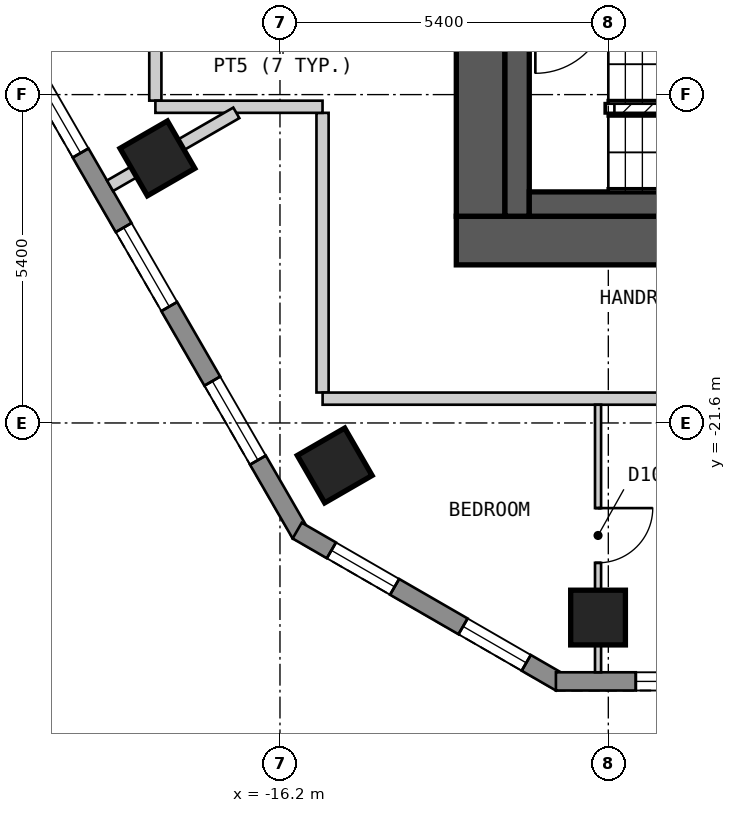
"""IFC4 building model, lengths in metres.
Left out: names, types, materials, properties, quantities, classifications, styles, units other than length and angle.
Written with IfcOpenShell. Run it as: python <this file> out.ifc"""

import sys

from ifc_helpers import new_model, si_unit, direction, frame, frame_2d, origin, origin_2d, place, context, subcontext, project, spatial, polyline, rectangle, outline, extrude, element, fill, save


model = new_model("IFC4")
c1 = context("Model", 3, precision=1e-05, world=origin(), true_north=direction((0.0, 1.0)))
c2 = subcontext(c1, "Body", "Model", "MODEL_VIEW")
j1 = project(units=[si_unit("LENGTHUNIT", "METRE"), si_unit("PLANEANGLEUNIT", "RADIAN")], contexts=[c1])
p1 = place(None, origin())
s1 = spatial("IfcSite", under=j1, at=p1, CompositionType="ELEMENT")
p2 = place(p1, origin())
s2 = spatial("IfcBuilding", under=s1, at=p2, CompositionType="ELEMENT")
p3 = place(p2, frame((0.0, 0.0, 126.6)))
s3 = spatial("IfcBuildingStorey", under=s2, at=p3, CompositionType="ELEMENT", Elevation=126.6)
for number, where, z_axis, x_axis in (
    (1, (-18.216, -17.249, 0.0), (0.0, 0.0, 1.0), (0.5, -0.866, 0.0)),
    (2, (-15.3, -22.299, 0.0), (0.0, 0.0, 1.0), (0.5, -0.866, 0.0)),
    (3, (-10.969, -24.8, 0.0), (0.0, 0.0, 1.0), (1.0, 0.0, 0.0)),
):
    element("IfcColumn", number, at=place(p3, frame(where, z_axis=z_axis, x_axis=x_axis)), inside=s3, PredefinedType="COLUMN", context=c2, shape_type="SweptSolid", body=[
        extrude(rectangle(XDim=0.9, YDim=0.9, at=origin_2d()), origin(), (0.0, 0.0, 1.0), 3.0),
    ])
p4 = place(p3, frame((-13.3, -18.6, 0.0), z_axis=(0.0, 0.0, 1.0), x_axis=(1.0, 0.0, 0.0)))
e4 = element("IfcWall", 4, at=p4, inside=s3, PredefinedType="SHEAR", context=c2, shape_type="SweptSolid", body=[
    extrude(rectangle(XDim=26.6, YDim=0.8, at=frame_2d((13.3, 0.0))), origin(), (0.0, 0.0, 1.0), 2.7),
])
p5 = place(p3, frame((-12.9, -18.2, 0.0), z_axis=(0.0, 0.0, 1.0), x_axis=(0.0, 1.0, 0.0)))
e5 = element("IfcWall", 5, at=p5, inside=s3, PredefinedType="SHEAR", context=c2, shape_type="SweptSolid", body=[
    extrude(rectangle(XDim=12.4, YDim=0.8, at=frame_2d((6.2, 0.0))), origin(), (0.0, 0.0, 1.0), 2.7),
])
p6 = place(p5, frame((4.0, 0.0, 0.0)))
e6 = element("IfcOpeningElement", 6, at=p6, cuts=e5, PredefinedType="OPENING", context=c2, shape_type="SweptSolid", body=[
    extrude(rectangle(XDim=1.2, YDim=2.1, at=frame_2d((0.6, 1.05))), frame((0.0, 0.41, 0.0), z_axis=(0.0, -1.0, 0.0), x_axis=(1.0, 0.0, 0.0)), (0.0, 0.0, 1.0), 0.82),
])
p7 = place(p3, frame((-28.218, -2.025, 0.0), z_axis=(0.0, 0.0, 1.0), x_axis=(0.500017503135, -0.866015298109, 0.0)))
e7 = element("IfcWall", 7, at=p7, inside=s3, PredefinedType="SOLIDWALL", context=c2, shape_type="SweptSolid", body=[
    extrude(outline(polyline([(0.0, -0.15), (24.711, -0.15), (24.631, 0.15), (0.08, 0.15), (0.0, -0.15)])), origin(), (0.0, 0.0, 1.0), 2.7),
])
p8 = place(p7, frame((1.4, 0.0, 0.15)))
e8 = element("IfcOpeningElement", 8, at=p8, cuts=e7, PredefinedType="OPENING", context=c2, shape_type="SweptSolid", body=[
    extrude(rectangle(XDim=1.5, YDim=2.1, at=frame_2d((0.75, 1.05))), frame((0.0, 0.16, 0.0), z_axis=(0.0, -1.0, 0.0), x_axis=(1.0, 0.0, 0.0)), (0.0, 0.0, 1.0), 0.32),
])
p9 = place(p7, frame((4.316, 0.0, 0.15)))
e9 = element("IfcOpeningElement", 9, at=p9, cuts=e7, PredefinedType="OPENING", context=c2, shape_type="SweptSolid", body=[
    extrude(rectangle(XDim=1.5, YDim=2.1, at=frame_2d((0.75, 1.05))), frame((0.0, 0.16, 0.0), z_axis=(0.0, -1.0, 0.0), x_axis=(1.0, 0.0, 0.0)), (0.0, 0.0, 1.0), 0.32),
])
p10 = place(p7, frame((7.231, 0.0, 0.15)))
e10 = element("IfcOpeningElement", 10, at=p10, cuts=e7, PredefinedType="OPENING", context=c2, shape_type="SweptSolid", body=[
    extrude(rectangle(XDim=1.5, YDim=2.1, at=frame_2d((0.75, 1.05))), frame((0.0, 0.16, 0.0), z_axis=(0.0, -1.0, 0.0), x_axis=(1.0, 0.0, 0.0)), (0.0, 0.0, 1.0), 0.32),
])
p11 = place(p7, frame((10.147, 0.0, 0.15)))
e11 = element("IfcOpeningElement", 11, at=p11, cuts=e7, PredefinedType="OPENING", context=c2, shape_type="SweptSolid", body=[
    extrude(rectangle(XDim=1.5, YDim=2.1, at=frame_2d((0.75, 1.05))), frame((0.0, 0.16, 0.0), z_axis=(0.0, -1.0, 0.0), x_axis=(1.0, 0.0, 0.0)), (0.0, 0.0, 1.0), 0.32),
])
p12 = place(p7, frame((13.062, 0.0, 0.15)))
e12 = element("IfcOpeningElement", 12, at=p12, cuts=e7, PredefinedType="OPENING", context=c2, shape_type="SweptSolid", body=[
    extrude(rectangle(XDim=1.5, YDim=2.1, at=frame_2d((0.75, 1.05))), frame((0.0, 0.16, 0.0), z_axis=(0.0, -1.0, 0.0), x_axis=(1.0, 0.0, 0.0)), (0.0, 0.0, 1.0), 0.32),
])
p13 = place(p7, frame((15.977, 0.0, 0.15)))
e13 = element("IfcOpeningElement", 13, at=p13, cuts=e7, PredefinedType="OPENING", context=c2, shape_type="SweptSolid", body=[
    extrude(rectangle(XDim=1.5, YDim=2.1, at=frame_2d((0.75, 1.05))), frame((0.0, 0.16, 0.0), z_axis=(0.0, -1.0, 0.0), x_axis=(1.0, 0.0, 0.0)), (0.0, 0.0, 1.0), 0.32),
])
p14 = place(p7, frame((18.893, 0.0, 0.15)))
e14 = element("IfcOpeningElement", 14, at=p14, cuts=e7, PredefinedType="OPENING", context=c2, shape_type="SweptSolid", body=[
    extrude(rectangle(XDim=1.5, YDim=2.1, at=frame_2d((0.75, 1.05))), frame((0.0, 0.16, 0.0), z_axis=(0.0, -1.0, 0.0), x_axis=(1.0, 0.0, 0.0)), (0.0, 0.0, 1.0), 0.32),
])
p15 = place(p7, frame((21.809, 0.0, 0.15)))
e15 = element("IfcOpeningElement", 15, at=p15, cuts=e7, PredefinedType="OPENING", context=c2, shape_type="SweptSolid", body=[
    extrude(rectangle(XDim=1.5, YDim=2.1, at=frame_2d((0.75, 1.05))), frame((0.0, 0.16, 0.0), z_axis=(0.0, -1.0, 0.0), x_axis=(1.0, 0.0, 0.0)), (0.0, 0.0, 1.0), 0.32),
])
p16 = place(p3, frame((-15.917, -23.37, 0.0), z_axis=(0.0, 0.0, 1.0), x_axis=(0.866022959057, -0.500004234368, 0.0)))
e16 = element("IfcWall", 16, at=p16, inside=s3, PredefinedType="SOLIDWALL", context=c2, shape_type="SweptSolid", body=[
    extrude(outline(polyline([(0.0, -0.15), (5.0, -0.15), (4.92, 0.15), (0.08, 0.15), (0.0, -0.15)])), origin(), (0.0, 0.0, 1.0), 2.7),
])
p17 = place(p16, frame((0.65, 0.0, 0.15)))
e17 = element("IfcOpeningElement", 17, at=p17, cuts=e16, PredefinedType="OPENING", context=c2, shape_type="SweptSolid", body=[
    extrude(rectangle(XDim=1.2, YDim=2.1, at=frame_2d((0.6, 1.05))), frame((0.0, 0.16, 0.0), z_axis=(0.0, -1.0, 0.0), x_axis=(1.0, 0.0, 0.0)), (0.0, 0.0, 1.0), 0.32),
])
p18 = place(p16, frame((3.15, 0.0, 0.15)))
e18 = element("IfcOpeningElement", 18, at=p18, cuts=e16, PredefinedType="OPENING", context=c2, shape_type="SweptSolid", body=[
    extrude(rectangle(XDim=1.2, YDim=2.1, at=frame_2d((0.6, 1.05))), frame((0.0, 0.16, 0.0), z_axis=(0.0, -1.0, 0.0), x_axis=(1.0, 0.0, 0.0)), (0.0, 0.0, 1.0), 0.32),
])
p19 = place(p3, frame((-11.662, -25.85, 0.0), z_axis=(0.0, 0.0, 1.0), x_axis=(1.0, 0.0, 0.0)))
e19 = element("IfcWall", 19, at=p19, inside=s3, PredefinedType="SOLIDWALL", context=c2, shape_type="SweptSolid", body=[
    extrude(outline(polyline([(0.0, -0.15), (23.324, -0.15), (23.244, 0.15), (0.08, 0.15), (0.0, -0.15)])), origin(), (0.0, 0.0, 1.0), 2.7),
])
p20 = place(p19, frame((1.314, 0.0, 0.15)))
e20 = element("IfcOpeningElement", 20, at=p20, cuts=e19, PredefinedType="OPENING", context=c2, shape_type="SweptSolid", body=[
    extrude(rectangle(XDim=1.5, YDim=2.1, at=frame_2d((0.75, 1.05))), frame((0.0, 0.16, 0.0), z_axis=(0.0, -1.0, 0.0), x_axis=(1.0, 0.0, 0.0)), (0.0, 0.0, 1.0), 0.32),
])
p21 = place(p19, frame((4.057, 0.0, 0.15)))
e21 = element("IfcOpeningElement", 21, at=p21, cuts=e19, PredefinedType="OPENING", context=c2, shape_type="SweptSolid", body=[
    extrude(rectangle(XDim=1.5, YDim=2.1, at=frame_2d((0.75, 1.05))), frame((0.0, 0.16, 0.0), z_axis=(0.0, -1.0, 0.0), x_axis=(1.0, 0.0, 0.0)), (0.0, 0.0, 1.0), 0.32),
])
p22 = place(p19, frame((6.799, 0.0, 0.15)))
e22 = element("IfcOpeningElement", 22, at=p22, cuts=e19, PredefinedType="OPENING", context=c2, shape_type="SweptSolid", body=[
    extrude(rectangle(XDim=1.5, YDim=2.1, at=frame_2d((0.75, 1.05))), frame((0.0, 0.16, 0.0), z_axis=(0.0, -1.0, 0.0), x_axis=(1.0, 0.0, 0.0)), (0.0, 0.0, 1.0), 0.32),
])
p23 = place(p19, frame((9.542, 0.0, 0.15)))
e23 = element("IfcOpeningElement", 23, at=p23, cuts=e19, PredefinedType="OPENING", context=c2, shape_type="SweptSolid", body=[
    extrude(rectangle(XDim=1.5, YDim=2.1, at=frame_2d((0.75, 1.05))), frame((0.0, 0.16, 0.0), z_axis=(0.0, -1.0, 0.0), x_axis=(1.0, 0.0, 0.0)), (0.0, 0.0, 1.0), 0.32),
])
p24 = place(p19, frame((12.284, 0.0, 0.15)))
e24 = element("IfcOpeningElement", 24, at=p24, cuts=e19, PredefinedType="OPENING", context=c2, shape_type="SweptSolid", body=[
    extrude(rectangle(XDim=1.5, YDim=2.1, at=frame_2d((0.75, 1.05))), frame((0.0, 0.16, 0.0), z_axis=(0.0, -1.0, 0.0), x_axis=(1.0, 0.0, 0.0)), (0.0, 0.0, 1.0), 0.32),
])
p25 = place(p19, frame((15.027, 0.0, 0.15)))
e25 = element("IfcOpeningElement", 25, at=p25, cuts=e19, PredefinedType="OPENING", context=c2, shape_type="SweptSolid", body=[
    extrude(rectangle(XDim=1.5, YDim=2.1, at=frame_2d((0.75, 1.05))), frame((0.0, 0.16, 0.0), z_axis=(0.0, -1.0, 0.0), x_axis=(1.0, 0.0, 0.0)), (0.0, 0.0, 1.0), 0.32),
])
p26 = place(p19, frame((17.769, 0.0, 0.15)))
e26 = element("IfcOpeningElement", 26, at=p26, cuts=e19, PredefinedType="OPENING", context=c2, shape_type="SweptSolid", body=[
    extrude(rectangle(XDim=1.5, YDim=2.1, at=frame_2d((0.75, 1.05))), frame((0.0, 0.16, 0.0), z_axis=(0.0, -1.0, 0.0), x_axis=(1.0, 0.0, 0.0)), (0.0, 0.0, 1.0), 0.32),
])
p27 = place(p19, frame((20.512, 0.0, 0.15)))
e27 = element("IfcOpeningElement", 27, at=p27, cuts=e19, PredefinedType="OPENING", context=c2, shape_type="SweptSolid", body=[
    extrude(rectangle(XDim=1.5, YDim=2.1, at=frame_2d((0.75, 1.05))), frame((0.0, 0.16, 0.0), z_axis=(0.0, -1.0, 0.0), x_axis=(1.0, 0.0, 0.0)), (0.0, 0.0, 1.0), 0.32),
])
p28 = place(p3, frame((-15.5, -16.5, 0.0), z_axis=(0.0, 0.0, 1.0), x_axis=(0.0, -1.0, 0.0)))
e28 = element("IfcWall", 28, at=p28, inside=s3, PredefinedType="PARTITIONING", context=c2, shape_type="SweptSolid", body=[
    extrude(rectangle(XDim=4.599, YDim=0.2, at=frame_2d((2.3, 0.0))), origin(), (0.0, 0.0, 1.0), 2.7),
])
p29 = place(p3, frame((-18.25, -10.593, 0.0), z_axis=(0.0, 0.0, 1.0), x_axis=(0.0, -1.0, 0.0)))
e29 = element("IfcWall", 29, at=p29, inside=s3, PredefinedType="PARTITIONING", context=c2, shape_type="SweptSolid", body=[
    extrude(rectangle(XDim=5.706, YDim=0.2, at=frame_2d((2.853, 0.0))), origin(), (0.0, 0.0, 1.0), 2.7),
])
p30 = place(p3, frame((-18.249, -16.4, 0.0), z_axis=(0.0, 0.0, 1.0), x_axis=(1.0, 0.0, 0.0)))
e30 = element("IfcWall", 30, at=p30, inside=s3, PredefinedType="PARTITIONING", context=c2, shape_type="SweptSolid", body=[
    extrude(rectangle(XDim=2.749, YDim=0.2, at=frame_2d((1.375, 0.0))), origin(), (0.0, 0.0, 1.0), 2.7),
])
p31 = place(p3, frame((-15.499, -21.2, 0.0), z_axis=(0.0, 0.0, 1.0), x_axis=(1.0, 0.0, 0.0)))
e31 = element("IfcWall", 31, at=p31, inside=s3, PredefinedType="PARTITIONING", context=c2, shape_type="SweptSolid", body=[
    extrude(rectangle(XDim=30.899, YDim=0.2, at=frame_2d((15.449, 0.0))), origin(), (0.0, 0.0, 1.0), 2.7),
])
p32 = place(p31, frame((12.258, 0.0, 0.0)))
e32 = element("IfcOpeningElement", 32, at=p32, cuts=e31, PredefinedType="OPENING", context=c2, shape_type="SweptSolid", body=[
    extrude(rectangle(XDim=1.0, YDim=2.1, at=frame_2d((0.5, 1.05))), frame((0.0, 0.11, 0.0), z_axis=(0.0, -1.0, 0.0), x_axis=(1.0, 0.0, 0.0)), (0.0, 0.0, 1.0), 0.22),
])
p33 = place(p3, frame((-10.969, -25.7, 0.0), z_axis=(0.0, 0.0, 1.0), x_axis=(0.0, 1.0, 0.0)))
e33 = element("IfcWall", 33, at=p33, inside=s3, PredefinedType="PARTITIONING", context=c2, shape_type="SweptSolid", body=[
    extrude(rectangle(XDim=4.4, YDim=0.1, at=frame_2d((2.2, 0.0))), origin(), (0.0, 0.0, 1.0), 2.7),
])
p34 = place(p33, frame((1.8, 0.0, 0.0)))
e34 = element("IfcOpeningElement", 34, at=p34, cuts=e33, PredefinedType="OPENING", context=c2, shape_type="SweptSolid", body=[
    extrude(rectangle(XDim=0.9, YDim=2.1, at=frame_2d((0.45, 1.05))), frame((0.0, 0.06, 0.0), z_axis=(0.0, -1.0, 0.0), x_axis=(1.0, 0.0, 0.0)), (0.0, 0.0, 1.0), 0.12),
])
p35 = place(p3, frame((-18.995, -17.699, 0.0), z_axis=(0.0, 0.0, 1.0), x_axis=(0.86607371389, 0.499916315105, 0.0)))
e35 = element("IfcWall", 35, at=p35, inside=s3, PredefinedType="PARTITIONING", context=c2, shape_type="SweptSolid", body=[
    extrude(rectangle(XDim=2.398, YDim=0.2, at=frame_2d((1.199, 0.0))), origin(), (0.0, 0.0, 1.0), 2.7),
])
p36 = place(p3, frame((-12.3, -18.2, 0.0), z_axis=(0.0, 0.0, 1.0), x_axis=(0.0, 1.0, 0.0)))
e36 = element("IfcWall", 36, at=p36, inside=s3, PredefinedType="SOLIDWALL", context=c2, shape_type="SweptSolid", body=[
    extrude(rectangle(XDim=3.35, YDim=0.4, at=frame_2d((1.675, 0.0))), origin(), (0.0, 0.0, 1.0), 2.7),
])
p37 = place(p3, frame((-12.1, -18.0, 0.0), z_axis=(0.0, 0.0, 1.0), x_axis=(1.0, 0.0, 0.0)))
e37 = element("IfcWall", 37, at=p37, inside=s3, PredefinedType="SOLIDWALL", context=c2, shape_type="SweptSolid", body=[
    extrude(rectangle(XDim=5.4, YDim=0.4, at=frame_2d((2.7, 0.0))), origin(), (0.0, 0.0, 1.0), 2.7),
])
p38 = place(p13, origin())
e38 = element("IfcWindow", 38, at=p38, inside=s3, PartitioningType="SINGLE_PANEL", PredefinedType="WINDOW", context=c2, shape_type="SweptSolid", body=[
    extrude(rectangle(XDim=1.5, YDim=2.1, at=frame_2d((0.75, 1.05))), frame((0.0, 0.03, 0.0), z_axis=(0.0, -1.0, 0.0), x_axis=(1.0, 0.0, 0.0)), (0.0, 0.0, 1.0), 0.06),
])
fill(e13, e38)
p39 = place(p14, origin())
e39 = element("IfcWindow", 39, at=p39, inside=s3, PartitioningType="SINGLE_PANEL", PredefinedType="WINDOW", context=c2, shape_type="SweptSolid", body=[
    extrude(rectangle(XDim=1.5, YDim=2.1, at=frame_2d((0.75, 1.05))), frame((0.0, 0.03, 0.0), z_axis=(0.0, -1.0, 0.0), x_axis=(1.0, 0.0, 0.0)), (0.0, 0.0, 1.0), 0.06),
])
fill(e14, e39)
p40 = place(p15, origin())
e40 = element("IfcWindow", 40, at=p40, inside=s3, PartitioningType="SINGLE_PANEL", PredefinedType="WINDOW", context=c2, shape_type="SweptSolid", body=[
    extrude(rectangle(XDim=1.5, YDim=2.1, at=frame_2d((0.75, 1.05))), frame((0.0, 0.03, 0.0), z_axis=(0.0, -1.0, 0.0), x_axis=(1.0, 0.0, 0.0)), (0.0, 0.0, 1.0), 0.06),
])
fill(e15, e40)
p41 = place(p17, origin())
e41 = element("IfcWindow", 41, at=p41, inside=s3, PartitioningType="SINGLE_PANEL", PredefinedType="WINDOW", context=c2, shape_type="SweptSolid", body=[
    extrude(rectangle(XDim=1.2, YDim=2.1, at=frame_2d((0.6, 1.05))), frame((0.0, 0.03, 0.0), z_axis=(0.0, -1.0, 0.0), x_axis=(1.0, 0.0, 0.0)), (0.0, 0.0, 1.0), 0.06),
])
fill(e17, e41)
p42 = place(p18, origin())
e42 = element("IfcWindow", 42, at=p42, inside=s3, PartitioningType="SINGLE_PANEL", PredefinedType="WINDOW", context=c2, shape_type="SweptSolid", body=[
    extrude(rectangle(XDim=1.2, YDim=2.1, at=frame_2d((0.6, 1.05))), frame((0.0, 0.03, 0.0), z_axis=(0.0, -1.0, 0.0), x_axis=(1.0, 0.0, 0.0)), (0.0, 0.0, 1.0), 0.06),
])
fill(e18, e42)
p43 = place(p20, origin())
e43 = element("IfcWindow", 43, at=p43, inside=s3, PartitioningType="SINGLE_PANEL", PredefinedType="WINDOW", context=c2, shape_type="SweptSolid", body=[
    extrude(rectangle(XDim=1.5, YDim=2.1, at=frame_2d((0.75, 1.05))), frame((0.0, 0.03, 0.0), z_axis=(0.0, -1.0, 0.0), x_axis=(1.0, 0.0, 0.0)), (0.0, 0.0, 1.0), 0.06),
])
fill(e20, e43)
p44 = place(p34, origin())
e44 = element("IfcDoor", 44, at=p44, inside=s3, OperationType="SINGLE_SWING_RIGHT", PredefinedType="DOOR", context=c2, shape_type="SweptSolid", body=[
    extrude(rectangle(XDim=0.9, YDim=2.1, at=frame_2d((0.45, 1.05))), frame((0.0, 0.025, 0.0), z_axis=(0.0, -1.0, 0.0), x_axis=(1.0, 0.0, 0.0)), (0.0, 0.0, 1.0), 0.05),
])
fill(e34, e44)
save(model, sys.argv[1])
